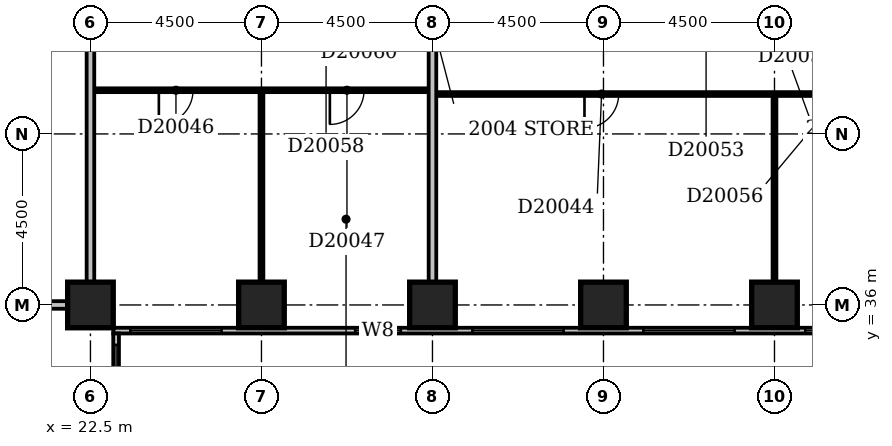
"""IFC4 building model, lengths in metres.
Left out: names, types, materials, properties, quantities, classifications, styles, units other than length and angle.
Written with IfcOpenShell. Run it as: python <this file> out.ifc"""

import sys

from ifc_helpers import new_model, si_unit, direction, frame, frame_2d, origin, origin_2d, place, context, subcontext, project, spatial, rectangle, extrude, element, fill, save


model = new_model("IFC4")
c1 = context("Model", 3, precision=1e-05, world=origin(), true_north=direction((0.0, 1.0)))
c2 = subcontext(c1, "Body", "Model", "MODEL_VIEW")
j1 = project(units=[si_unit("LENGTHUNIT", "METRE"), si_unit("PLANEANGLEUNIT", "RADIAN")], contexts=[c1])
p1 = place(None, origin())
s1 = spatial("IfcSite", under=j1, at=p1, CompositionType="ELEMENT")
p2 = place(p1, origin())
s2 = spatial("IfcBuilding", under=s1, at=p2, CompositionType="ELEMENT")
p3 = place(p2, frame((0.0, 0.0, 83.0)))
s3 = spatial("IfcBuildingStorey", under=s2, at=p3, CompositionType="ELEMENT", Elevation=83.0)
for number, where, z_axis, x_axis in (
    (1, (22.5, 36.0, -0.3), (0.0, 0.0, 1.0), (1.0, 0.0, 0.0)),
    (2, (27.0, 36.0, -0.3), (0.0, 0.0, 1.0), (1.0, 0.0, 0.0)),
    (3, (31.5, 36.0, -0.3), (0.0, 0.0, 1.0), (1.0, 0.0, 0.0)),
    (4, (36.0, 36.0, -0.3), (0.0, 0.0, 1.0), (1.0, 0.0, 0.0)),
    (5, (40.5, 36.0, -0.3), (0.0, 0.0, 1.0), (1.0, 0.0, 0.0)),
):
    element("IfcColumn", number, at=place(p3, frame(where, z_axis=z_axis, x_axis=x_axis)), inside=s3, PredefinedType="COLUMN", context=c2, shape_type="SweptSolid", body=[
        extrude(rectangle(XDim=1.2, YDim=1.2, at=origin_2d()), origin(), (0.0, 0.0, 1.0), 3.6),
    ])
p4 = place(p3, frame((23.175, 17.4, 0.0), z_axis=(0.0, 0.0, 1.0), x_axis=(0.0, 1.0, 0.0)))
e6 = element("IfcWall", 6, at=p4, inside=s3, PredefinedType="STANDARD", context=c2, shape_type="SweptSolid", body=[
    extrude(rectangle(XDim=17.85, YDim=0.15, at=frame_2d((8.925, 0.0))), origin(), (0.0, 0.0, 1.0), 2.7),
])
p5 = place(p4, frame((1.65, 0.0, 0.6)))
e7 = element("IfcOpeningElement", 7, at=p5, cuts=e6, PredefinedType="OPENING", context=c2, shape_type="SweptSolid", body=[
    extrude(rectangle(XDim=2.4, YDim=1.8, at=frame_2d((1.2, 0.9))), frame((0.0, 0.087, 0.0), z_axis=(0.0, -1.0, 0.0), x_axis=(1.0, 0.0, 0.0)), (0.0, 0.0, 1.0), 0.174),
])
p6 = place(p4, frame((5.926, 0.0, 0.6)))
e8 = element("IfcOpeningElement", 8, at=p6, cuts=e6, PredefinedType="OPENING", context=c2, shape_type="SweptSolid", body=[
    extrude(rectangle(XDim=0.45, YDim=1.8, at=frame_2d((0.225, 0.9))), frame((0.0, 0.087, 0.0), z_axis=(0.0, -1.0, 0.0), x_axis=(1.0, 0.0, 0.0)), (0.0, 0.0, 1.0), 0.174),
])
p7 = place(p4, frame((10.65, 0.0, 0.6)))
e9 = element("IfcOpeningElement", 9, at=p7, cuts=e6, PredefinedType="OPENING", context=c2, shape_type="SweptSolid", body=[
    extrude(rectangle(XDim=2.4, YDim=1.8, at=frame_2d((1.2, 0.9))), frame((0.0, 0.087, 0.0), z_axis=(0.0, -1.0, 0.0), x_axis=(1.0, 0.0, 0.0)), (0.0, 0.0, 1.0), 0.174),
])
p8 = place(p4, frame((15.15, 0.0, 0.6)))
e10 = element("IfcOpeningElement", 10, at=p8, cuts=e6, PredefinedType="OPENING", context=c2, shape_type="SweptSolid", body=[
    extrude(rectangle(XDim=2.4, YDim=1.8, at=frame_2d((1.2, 0.9))), frame((0.0, 0.087, 0.0), z_axis=(0.0, -1.0, 0.0), x_axis=(1.0, 0.0, 0.0)), (0.0, 0.0, 1.0), 0.174),
])
p9 = place(p3, frame((23.1, 35.325, 0.0), z_axis=(0.0, 0.0, 1.0), x_axis=(1.0, 0.0, 0.0)))
e11 = element("IfcWall", 11, at=p9, inside=s3, PredefinedType="STANDARD", context=c2, shape_type="SweptSolid", body=[
    extrude(rectangle(XDim=45.15, YDim=0.15, at=frame_2d((22.575, 0.0))), origin(), (0.0, 0.0, 1.0), 2.7),
])
p10 = place(p9, frame((0.45, 0.0, 0.6)))
e12 = element("IfcOpeningElement", 12, at=p10, cuts=e11, PredefinedType="OPENING", context=c2, shape_type="SweptSolid", body=[
    extrude(rectangle(XDim=2.4, YDim=1.8, at=frame_2d((1.2, 0.9))), frame((0.0, 0.087, 0.0), z_axis=(0.0, -1.0, 0.0), x_axis=(1.0, 0.0, 0.0)), (0.0, 0.0, 1.0), 0.174),
])
p11 = place(p9, frame((6.366, 0.0, 0.6)))
e13 = element("IfcOpeningElement", 13, at=p11, cuts=e11, PredefinedType="OPENING", context=c2, shape_type="SweptSolid", body=[
    extrude(rectangle(XDim=1.2, YDim=1.8, at=frame_2d((0.6, 0.9))), frame((0.0, 0.087, 0.0), z_axis=(0.0, -1.0, 0.0), x_axis=(1.0, 0.0, 0.0)), (0.0, 0.0, 1.0), 0.174),
])
p12 = place(p9, frame((9.45, 0.0, 0.6)))
e14 = element("IfcOpeningElement", 14, at=p12, cuts=e11, PredefinedType="OPENING", context=c2, shape_type="SweptSolid", body=[
    extrude(rectangle(XDim=2.4, YDim=1.8, at=frame_2d((1.2, 0.9))), frame((0.0, 0.087, 0.0), z_axis=(0.0, -1.0, 0.0), x_axis=(1.0, 0.0, 0.0)), (0.0, 0.0, 1.0), 0.174),
])
p13 = place(p9, frame((13.95, 0.0, 0.6)))
e15 = element("IfcOpeningElement", 15, at=p13, cuts=e11, PredefinedType="OPENING", context=c2, shape_type="SweptSolid", body=[
    extrude(rectangle(XDim=2.4, YDim=1.8, at=frame_2d((1.2, 0.9))), frame((0.0, 0.087, 0.0), z_axis=(0.0, -1.0, 0.0), x_axis=(1.0, 0.0, 0.0)), (0.0, 0.0, 1.0), 0.174),
])
p14 = place(p9, frame((18.21, 0.0, 0.6)))
e16 = element("IfcOpeningElement", 16, at=p14, cuts=e11, PredefinedType="OPENING", context=c2, shape_type="SweptSolid", body=[
    extrude(rectangle(XDim=1.8, YDim=1.8, at=frame_2d((0.9, 0.9))), frame((0.0, 0.087, 0.0), z_axis=(0.0, -1.0, 0.0), x_axis=(1.0, 0.0, 0.0)), (0.0, 0.0, 1.0), 0.174),
])
p15 = place(p9, frame((22.95, 0.0, 0.6)))
e17 = element("IfcOpeningElement", 17, at=p15, cuts=e11, PredefinedType="OPENING", context=c2, shape_type="SweptSolid", body=[
    extrude(rectangle(XDim=2.4, YDim=1.8, at=frame_2d((1.2, 0.9))), frame((0.0, 0.087, 0.0), z_axis=(0.0, -1.0, 0.0), x_axis=(1.0, 0.0, 0.0)), (0.0, 0.0, 1.0), 0.174),
])
p16 = place(p9, frame((27.45, 0.0, 0.6)))
e18 = element("IfcOpeningElement", 18, at=p16, cuts=e11, PredefinedType="OPENING", context=c2, shape_type="SweptSolid", body=[
    extrude(rectangle(XDim=2.4, YDim=1.8, at=frame_2d((1.2, 0.9))), frame((0.0, 0.087, 0.0), z_axis=(0.0, -1.0, 0.0), x_axis=(1.0, 0.0, 0.0)), (0.0, 0.0, 1.0), 0.174),
])
p17 = place(p9, frame((31.831, 0.0, 0.6)))
e19 = element("IfcOpeningElement", 19, at=p17, cuts=e11, PredefinedType="OPENING", context=c2, shape_type="SweptSolid", body=[
    extrude(rectangle(XDim=0.6, YDim=1.8, at=frame_2d((0.3, 0.9))), frame((0.0, 0.087, 0.0), z_axis=(0.0, -1.0, 0.0), x_axis=(1.0, 0.0, 0.0)), (0.0, 0.0, 1.0), 0.174),
])
p18 = place(p9, frame((36.45, 0.0, 0.6)))
e20 = element("IfcOpeningElement", 20, at=p18, cuts=e11, PredefinedType="OPENING", context=c2, shape_type="SweptSolid", body=[
    extrude(rectangle(XDim=2.4, YDim=1.8, at=frame_2d((1.2, 0.9))), frame((0.0, 0.087, 0.0), z_axis=(0.0, -1.0, 0.0), x_axis=(1.0, 0.0, 0.0)), (0.0, 0.0, 1.0), 0.174),
])
p19 = place(p9, frame((40.95, 0.0, 0.6)))
e21 = element("IfcOpeningElement", 21, at=p19, cuts=e11, PredefinedType="OPENING", context=c2, shape_type="SweptSolid", body=[
    extrude(rectangle(XDim=2.4, YDim=1.8, at=frame_2d((1.2, 0.9))), frame((0.0, 0.087, 0.0), z_axis=(0.0, -1.0, 0.0), x_axis=(1.0, 0.0, 0.0)), (0.0, 0.0, 1.0), 0.174),
])
p20 = place(p3, frame((9.1, 36.0, 0.0), z_axis=(0.0, 0.0, 1.0), x_axis=(1.0, 0.0, 0.0)))
e22 = element("IfcWall", 22, at=p20, inside=s3, PredefinedType="PARTITIONING", context=c2, shape_type="SweptSolid", body=[
    extrude(rectangle(XDim=12.8, YDim=0.2, at=frame_2d((6.4, 0.0))), origin(), (0.0, 0.0, 1.0), 2.4),
])
p21 = place(p3, frame((22.5, 36.6, 0.0), z_axis=(0.0, 0.0, 1.0), x_axis=(0.0, 1.0, 0.0)))
e23 = element("IfcWall", 23, at=p21, inside=s3, PredefinedType="PARTITIONING", context=c2, shape_type="SweptSolid", body=[
    extrude(rectangle(XDim=12.8, YDim=0.2, at=frame_2d((6.4, 0.0))), origin(), (0.0, 0.0, 1.0), 3.3),
])
p22 = place(p3, frame((27.0, 36.6, 0.0), z_axis=(0.0, 0.0, 1.0), x_axis=(0.0, 1.0, 0.0)))
e24 = element("IfcWall", 24, at=p22, inside=s3, PredefinedType="PARTITIONING", context=c2, shape_type="SweptSolid", body=[
    extrude(rectangle(XDim=5.0, YDim=0.1, at=frame_2d((2.5, 0.0))), origin(), (0.0, 0.0, 1.0), 2.6),
])
p23 = place(p3, frame((31.5, 36.6, 0.0), z_axis=(0.0, 0.0, 1.0), x_axis=(0.0, 1.0, 0.0)))
e25 = element("IfcWall", 25, at=p23, inside=s3, PredefinedType="PARTITIONING", context=c2, shape_type="SweptSolid", body=[
    extrude(rectangle(XDim=12.8, YDim=0.2, at=frame_2d((6.4, 0.0))), origin(), (0.0, 0.0, 1.0), 3.3),
])
p24 = place(p3, frame((40.5, 36.6, 0.0), z_axis=(0.0, 0.0, 1.0), x_axis=(0.0, 1.0, 0.0)))
e26 = element("IfcWall", 26, at=p24, inside=s3, PredefinedType="PARTITIONING", context=c2, shape_type="SweptSolid", body=[
    extrude(rectangle(XDim=4.9, YDim=0.1, at=frame_2d((2.45, 0.0))), origin(), (0.0, 0.0, 1.0), 3.3),
])
p25 = place(p3, frame((31.6, 41.55, 0.0), z_axis=(0.0, 0.0, 1.0), x_axis=(1.0, 0.0, 0.0)))
e27 = element("IfcWall", 27, at=p25, inside=s3, PredefinedType="PARTITIONING", context=c2, shape_type="SweptSolid", body=[
    extrude(rectangle(XDim=13.3, YDim=0.1, at=frame_2d((6.65, 0.0))), origin(), (0.0, 0.0, 1.0), 3.3),
])
p26 = place(p25, frame((3.9, 0.0, 0.0)))
e28 = element("IfcOpeningElement", 28, at=p26, cuts=e27, PredefinedType="OPENING", context=c2, shape_type="SweptSolid", body=[
    extrude(rectangle(XDim=0.9, YDim=2.1, at=frame_2d((0.45, 1.05))), frame((0.0, 0.062, 0.0), z_axis=(0.0, -1.0, 0.0), x_axis=(1.0, 0.0, 0.0)), (0.0, 0.0, 1.0), 0.124),
])
p27 = place(p25, frame((10.7, 0.0, 0.0)))
e29 = element("IfcOpeningElement", 29, at=p27, cuts=e27, PredefinedType="OPENING", context=c2, shape_type="SweptSolid", body=[
    extrude(rectangle(XDim=0.9, YDim=2.1, at=frame_2d((0.45, 1.05))), frame((0.0, 0.062, 0.0), z_axis=(0.0, -1.0, 0.0), x_axis=(1.0, 0.0, 0.0)), (0.0, 0.0, 1.0), 0.124),
])
p28 = place(p3, frame((22.6, 41.65, 0.0), z_axis=(0.0, 0.0, 1.0), x_axis=(1.0, 0.0, 0.0)))
e30 = element("IfcWall", 30, at=p28, inside=s3, PredefinedType="PARTITIONING", context=c2, shape_type="SweptSolid", body=[
    extrude(rectangle(XDim=8.8, YDim=0.1, at=frame_2d((4.4, 0.0))), origin(), (0.0, 0.0, 1.0), 3.3),
])
p29 = place(p28, frame((1.7, 0.0, 0.0)))
e31 = element("IfcOpeningElement", 31, at=p29, cuts=e30, PredefinedType="OPENING", context=c2, shape_type="SweptSolid", body=[
    extrude(rectangle(XDim=0.9, YDim=2.1, at=frame_2d((0.45, 1.05))), frame((0.0, 0.062, 0.0), z_axis=(0.0, -1.0, 0.0), x_axis=(1.0, 0.0, 0.0)), (0.0, 0.0, 1.0), 0.124),
])
p30 = place(p28, frame((6.2, 0.0, 0.0)))
e32 = element("IfcOpeningElement", 32, at=p30, cuts=e30, PredefinedType="OPENING", context=c2, shape_type="SweptSolid", body=[
    extrude(rectangle(XDim=0.9, YDim=2.1, at=frame_2d((0.45, 1.05))), frame((0.0, 0.062, 0.0), z_axis=(0.0, -1.0, 0.0), x_axis=(1.0, 0.0, 0.0)), (0.0, 0.0, 1.0), 0.124),
])
p31 = place(p8, origin())
e33 = element("IfcWindow", 33, at=p31, inside=s3, PartitioningType="SINGLE_PANEL", PredefinedType="WINDOW", context=c2, shape_type="SweptSolid", body=[
    extrude(rectangle(XDim=2.4, YDim=1.8, at=frame_2d((1.2, 0.9))), frame((0.0, 0.03, 0.0), z_axis=(0.0, -1.0, 0.0), x_axis=(1.0, 0.0, 0.0)), (0.0, 0.0, 1.0), 0.06),
])
fill(e10, e33)
p32 = place(p10, origin())
e34 = element("IfcWindow", 34, at=p32, inside=s3, PartitioningType="SINGLE_PANEL", PredefinedType="WINDOW", context=c2, shape_type="SweptSolid", body=[
    extrude(rectangle(XDim=2.4, YDim=1.8, at=frame_2d((1.2, 0.9))), frame((0.0, 0.03, 0.0), z_axis=(0.0, -1.0, 0.0), x_axis=(1.0, 0.0, 0.0)), (0.0, 0.0, 1.0), 0.06),
])
fill(e12, e34)
p33 = place(p11, origin())
e35 = element("IfcWindow", 35, at=p33, inside=s3, PartitioningType="SINGLE_PANEL", PredefinedType="WINDOW", context=c2, shape_type="SweptSolid", body=[
    extrude(rectangle(XDim=1.2, YDim=1.8, at=frame_2d((0.6, 0.9))), frame((0.0, 0.03, 0.0), z_axis=(0.0, -1.0, 0.0), x_axis=(1.0, 0.0, 0.0)), (0.0, 0.0, 1.0), 0.06),
])
fill(e13, e35)
p34 = place(p12, origin())
e36 = element("IfcWindow", 36, at=p34, inside=s3, PartitioningType="SINGLE_PANEL", PredefinedType="WINDOW", context=c2, shape_type="SweptSolid", body=[
    extrude(rectangle(XDim=2.4, YDim=1.8, at=frame_2d((1.2, 0.9))), frame((0.0, 0.03, 0.0), z_axis=(0.0, -1.0, 0.0), x_axis=(1.0, 0.0, 0.0)), (0.0, 0.0, 1.0), 0.06),
])
fill(e14, e36)
p35 = place(p13, origin())
e37 = element("IfcWindow", 37, at=p35, inside=s3, PartitioningType="SINGLE_PANEL", PredefinedType="WINDOW", context=c2, shape_type="SweptSolid", body=[
    extrude(rectangle(XDim=2.4, YDim=1.8, at=frame_2d((1.2, 0.9))), frame((0.0, 0.03, 0.0), z_axis=(0.0, -1.0, 0.0), x_axis=(1.0, 0.0, 0.0)), (0.0, 0.0, 1.0), 0.06),
])
fill(e15, e37)
p36 = place(p14, origin())
e38 = element("IfcWindow", 38, at=p36, inside=s3, PartitioningType="SINGLE_PANEL", PredefinedType="WINDOW", context=c2, shape_type="SweptSolid", body=[
    extrude(rectangle(XDim=1.8, YDim=1.8, at=frame_2d((0.9, 0.9))), frame((0.0, 0.03, 0.0), z_axis=(0.0, -1.0, 0.0), x_axis=(1.0, 0.0, 0.0)), (0.0, 0.0, 1.0), 0.06),
])
fill(e16, e38)
p37 = place(p26, frame((0.9, 0.0, 0.0), z_axis=(0.0, 0.0, 1.0), x_axis=(-1.0, 0.0, 0.0)))
e39 = element("IfcDoor", 39, at=p37, inside=s3, OperationType="SINGLE_SWING_RIGHT", PredefinedType="DOOR", context=c2, shape_type="SweptSolid", body=[
    extrude(rectangle(XDim=0.9, YDim=2.1, at=frame_2d((0.45, 1.05))), frame((0.0, 0.025, 0.0), z_axis=(0.0, -1.0, 0.0), x_axis=(1.0, 0.0, 0.0)), (0.0, 0.0, 1.0), 0.05),
])
fill(e28, e39)
p38 = place(p29, frame((0.9, 0.0, 0.0), z_axis=(0.0, 0.0, 1.0), x_axis=(-1.0, 0.0, 0.0)))
e40 = element("IfcDoor", 40, at=p38, inside=s3, OperationType="SINGLE_SWING_RIGHT", PredefinedType="DOOR", context=c2, shape_type="SweptSolid", body=[
    extrude(rectangle(XDim=0.9, YDim=2.1, at=frame_2d((0.45, 1.05))), frame((0.0, 0.025, 0.0), z_axis=(0.0, -1.0, 0.0), x_axis=(1.0, 0.0, 0.0)), (0.0, 0.0, 1.0), 0.05),
])
fill(e31, e40)
p39 = place(p30, frame((0.9, 0.0, 0.0), z_axis=(0.0, 0.0, 1.0), x_axis=(-1.0, 0.0, 0.0)))
e41 = element("IfcDoor", 41, at=p39, inside=s3, OperationType="SINGLE_SWING_RIGHT", PredefinedType="DOOR", context=c2, shape_type="SweptSolid", body=[
    extrude(rectangle(XDim=0.9, YDim=2.1, at=frame_2d((0.45, 1.05))), frame((0.0, 0.025, 0.0), z_axis=(0.0, -1.0, 0.0), x_axis=(1.0, 0.0, 0.0)), (0.0, 0.0, 1.0), 0.05),
])
fill(e32, e41)
save(model, sys.argv[1])
